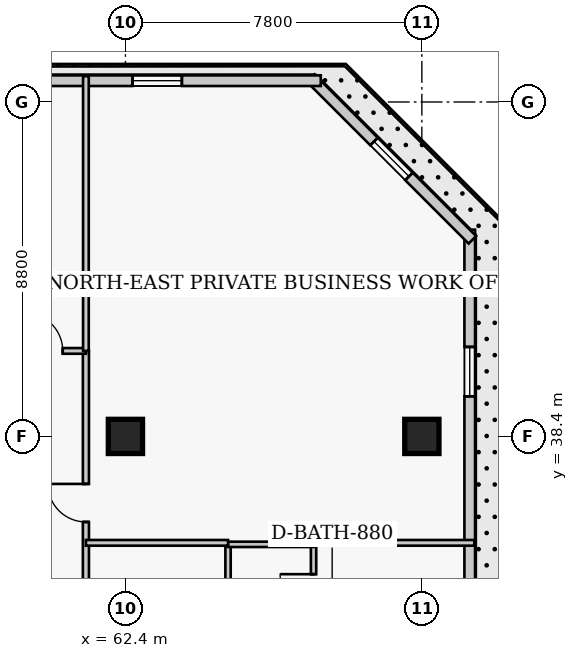
"""IFC4 building model, lengths in metres.
Left out: names, types, materials, properties, quantities, classifications, styles, units other than length and angle.
Written with IfcOpenShell. Run it as: python <this file> out.ifc"""

import sys

from ifc_helpers import new_model, si_unit, direction, frame, frame_2d, origin, origin_2d, place, context, subcontext, project, spatial, rectangle, extrude, element, fill, save


model = new_model("IFC4")
c1 = context("Model", 3, precision=1e-05, world=origin(), true_north=direction((0.0, 1.0)))
c2 = subcontext(c1, "Body", "Model", "MODEL_VIEW")
j1 = project(units=[si_unit("LENGTHUNIT", "METRE"), si_unit("PLANEANGLEUNIT", "RADIAN")], contexts=[c1])
p1 = place(None, origin())
s1 = spatial("IfcSite", under=j1, at=p1, CompositionType="ELEMENT")
p2 = place(p1, origin())
s2 = spatial("IfcBuilding", under=s1, at=p2, CompositionType="ELEMENT")
p3 = place(p2, frame((0.0, 0.0, 189.0)))
s3 = spatial("IfcBuildingStorey", under=s2, at=p3, CompositionType="ELEMENT", Elevation=189.0)
for number, where, z_axis, x_axis in (
    (1, (62.4, 38.4, 0.0), (0.0, 0.0, 1.0), (1.0, 0.0, 0.0)),
    (2, (70.2, 38.4, 0.0), (0.0, 0.0, 1.0), (1.0, 0.0, 0.0)),
):
    element("IfcColumn", number, at=place(p3, frame(where, z_axis=z_axis, x_axis=x_axis)), inside=s3, PredefinedType="COLUMN", context=c2, shape_type="SweptSolid", body=[
        extrude(rectangle(XDim=0.9, YDim=0.9, at=origin_2d()), origin(), (0.0, 0.0, 1.0), 3.9),
    ])
p4 = place(p3, frame((71.46, 13.96, 0.0), z_axis=(0.0, 0.0, 1.0), x_axis=(0.0, 1.0, 0.0)))
e3 = element("IfcWall", 3, at=p4, inside=s3, PredefinedType="SOLIDWALL", context=c2, shape_type="SweptSolid", body=[
    extrude(rectangle(XDim=29.88, YDim=0.28, at=frame_2d((14.94, 0.0))), origin(), (0.0, 0.0, 1.0), 3.65),
])
p5 = place(p4, frame((3.085, 0.0, 0.85)))
e4 = element("IfcOpeningElement", 4, at=p5, cuts=e3, PredefinedType="OPENING", context=c2, shape_type="SweptSolid", body=[
    extrude(rectangle(XDim=1.3, YDim=1.7, at=frame_2d((0.65, 0.85))), frame((0.0, 0.15, 0.0), z_axis=(0.0, -1.0, 0.0), x_axis=(1.0, 0.0, 0.0)), (0.0, 0.0, 1.0), 0.3),
])
p6 = place(p4, frame((10.555, 0.0, 0.85)))
e5 = element("IfcOpeningElement", 5, at=p6, cuts=e3, PredefinedType="OPENING", context=c2, shape_type="SweptSolid", body=[
    extrude(rectangle(XDim=1.3, YDim=1.7, at=frame_2d((0.65, 0.85))), frame((0.0, 0.15, 0.0), z_axis=(0.0, -1.0, 0.0), x_axis=(1.0, 0.0, 0.0)), (0.0, 0.0, 1.0), 0.3),
])
p7 = place(p4, frame((18.025, 0.0, 0.85)))
e6 = element("IfcOpeningElement", 6, at=p7, cuts=e3, PredefinedType="OPENING", context=c2, shape_type="SweptSolid", body=[
    extrude(rectangle(XDim=1.3, YDim=1.7, at=frame_2d((0.65, 0.85))), frame((0.0, 0.15, 0.0), z_axis=(0.0, -1.0, 0.0), x_axis=(1.0, 0.0, 0.0)), (0.0, 0.0, 1.0), 0.3),
])
p8 = place(p4, frame((25.495, 0.0, 0.85)))
e7 = element("IfcOpeningElement", 7, at=p8, cuts=e3, PredefinedType="OPENING", context=c2, shape_type="SweptSolid", body=[
    extrude(rectangle(XDim=1.3, YDim=1.7, at=frame_2d((0.65, 0.85))), frame((0.0, 0.15, 0.0), z_axis=(0.0, -1.0, 0.0), x_axis=(1.0, 0.0, 0.0)), (0.0, 0.0, 1.0), 0.3),
])
p9 = place(p3, frame((71.529, 43.573, 0.0), z_axis=(0.0, 0.0, 1.0), x_axis=(-0.707106781187, 0.707106781187, 0.0)))
e8 = element("IfcWall", 8, at=p9, inside=s3, PredefinedType="SOLIDWALL", context=c2, shape_type="SweptSolid", body=[
    extrude(rectangle(XDim=6.02, YDim=0.28, at=frame_2d((3.01, 0.0))), origin(), (0.0, 0.0, 1.0), 3.65),
])
p10 = place(p9, frame((2.36, 0.0, 0.85)))
e9 = element("IfcOpeningElement", 9, at=p10, cuts=e8, PredefinedType="OPENING", context=c2, shape_type="SweptSolid", body=[
    extrude(rectangle(XDim=1.3, YDim=1.7, at=frame_2d((0.65, 0.85))), frame((0.0, 0.15, 0.0), z_axis=(0.0, -1.0, 0.0), x_axis=(1.0, 0.0, 0.0)), (0.0, 0.0, 1.0), 0.3),
])
p11 = place(p3, frame((67.54, 47.76, 0.0), z_axis=(0.0, 0.0, 1.0), x_axis=(-1.0, 0.0, 0.0)))
e10 = element("IfcWall", 10, at=p11, inside=s3, PredefinedType="SOLIDWALL", context=c2, shape_type="SweptSolid", body=[
    extrude(rectangle(XDim=25.83, YDim=0.28, at=frame_2d((12.915, 0.0))), origin(), (0.0, 0.0, 1.0), 3.65),
])
p12 = place(p11, frame((3.655, 0.0, 0.85)))
e11 = element("IfcOpeningElement", 11, at=p12, cuts=e10, PredefinedType="OPENING", context=c2, shape_type="SweptSolid", body=[
    extrude(rectangle(XDim=1.3, YDim=1.7, at=frame_2d((0.65, 0.85))), frame((0.0, 0.15, 0.0), z_axis=(0.0, -1.0, 0.0), x_axis=(1.0, 0.0, 0.0)), (0.0, 0.0, 1.0), 0.3),
])
p13 = place(p11, frame((22.025, 0.0, 0.85)))
e12 = element("IfcOpeningElement", 12, at=p13, cuts=e10, PredefinedType="OPENING", context=c2, shape_type="SweptSolid", body=[
    extrude(rectangle(XDim=1.3, YDim=1.7, at=frame_2d((0.65, 0.85))), frame((0.0, 0.15, 0.0), z_axis=(0.0, -1.0, 0.0), x_axis=(1.0, 0.0, 0.0)), (0.0, 0.0, 1.0), 0.3),
])
p14 = place(p3, frame((61.36, 11.95, 0.0), z_axis=(0.0, 0.0, 1.0), x_axis=(0.0, 1.0, 0.0)))
e13 = element("IfcWall", 13, at=p14, inside=s3, PredefinedType="PARTITIONING", context=c2, shape_type="SweptSolid", body=[
    extrude(rectangle(XDim=28.7, YDim=0.16, at=frame_2d((14.35, 0.0))), origin(), (0.0, 0.0, 1.0), 3.65),
])
p15 = place(p14, frame((3.55, 0.0, 0.0)))
e14 = element("IfcOpeningElement", 14, at=p15, cuts=e13, PredefinedType="OPENING", context=c2, shape_type="SweptSolid", body=[
    extrude(rectangle(XDim=0.95, YDim=2.1, at=frame_2d((0.475, 1.05))), frame((0.0, 0.09, 0.0), z_axis=(0.0, -1.0, 0.0), x_axis=(1.0, 0.0, 0.0)), (0.0, 0.0, 1.0), 0.18),
])
p16 = place(p14, frame((11.975, 0.0, 0.0)))
e15 = element("IfcOpeningElement", 15, at=p16, cuts=e13, PredefinedType="OPENING", context=c2, shape_type="SweptSolid", body=[
    extrude(rectangle(XDim=0.95, YDim=2.1, at=frame_2d((0.475, 1.05))), frame((0.0, 0.09, 0.0), z_axis=(0.0, -1.0, 0.0), x_axis=(1.0, 0.0, 0.0)), (0.0, 0.0, 1.0), 0.18),
])
p17 = place(p14, frame((19.775, 0.0, 0.0)))
e16 = element("IfcOpeningElement", 16, at=p17, cuts=e13, PredefinedType="OPENING", context=c2, shape_type="SweptSolid", body=[
    extrude(rectangle(XDim=0.95, YDim=2.1, at=frame_2d((0.475, 1.05))), frame((0.0, 0.09, 0.0), z_axis=(0.0, -1.0, 0.0), x_axis=(1.0, 0.0, 0.0)), (0.0, 0.0, 1.0), 0.18),
])
p18 = place(p14, frame((24.2, 0.0, 0.0)))
e17 = element("IfcOpeningElement", 17, at=p18, cuts=e13, PredefinedType="OPENING", context=c2, shape_type="SweptSolid", body=[
    extrude(rectangle(XDim=1.0, YDim=2.15, at=frame_2d((0.5, 1.075))), frame((0.0, 0.09, 0.0), z_axis=(0.0, -1.0, 0.0), x_axis=(1.0, 0.0, 0.0)), (0.0, 0.0, 1.0), 0.18),
])
p19 = place(p3, frame((56.8, 40.65, 0.0), z_axis=(0.0, 0.0, 1.0), x_axis=(1.0, 0.0, 0.0)))
e18 = element("IfcWall", 18, at=p19, inside=s3, PredefinedType="PARTITIONING", context=c2, shape_type="SweptSolid", body=[
    extrude(rectangle(XDim=4.56, YDim=0.15, at=frame_2d((2.28, 0.0))), origin(), (0.0, 0.0, 1.0), 3.65),
])
p20 = place(p19, frame((2.95, 0.0, 0.0)))
e19 = element("IfcOpeningElement", 19, at=p20, cuts=e18, PredefinedType="OPENING", context=c2, shape_type="SweptSolid", body=[
    extrude(rectangle(XDim=1.0, YDim=2.15, at=frame_2d((0.5, 1.075))), frame((0.0, 0.085, 0.0), z_axis=(0.0, -1.0, 0.0), x_axis=(1.0, 0.0, 0.0)), (0.0, 0.0, 1.0), 0.17),
])
p21 = place(p3, frame((61.36, 40.65, 0.0), z_axis=(0.0, 0.0, 1.0), x_axis=(0.0, 1.0, 0.0)))
e20 = element("IfcWall", 20, at=p21, inside=s3, PredefinedType="PARTITIONING", context=c2, shape_type="SweptSolid", body=[
    extrude(rectangle(XDim=7.23, YDim=0.15, at=frame_2d((3.615, 0.0))), origin(), (0.0, 0.0, 1.0), 3.65),
])
p22 = place(p3, frame((65.1, 33.11, 0.0), z_axis=(0.0, 0.0, 1.0), x_axis=(0.0, 1.0, 0.0)))
e21 = element("IfcWall", 21, at=p22, inside=s3, PredefinedType="PLUMBINGWALL", context=c2, shape_type="SweptSolid", body=[
    extrude(rectangle(XDim=2.45, YDim=0.14, at=frame_2d((1.225, 0.0))), origin(), (0.0, 0.0, 1.0), 3.65),
])
p23 = place(p3, frame((67.35, 33.11, 0.0), z_axis=(0.0, 0.0, 1.0), x_axis=(0.0, 1.0, 0.0)))
e22 = element("IfcWall", 22, at=p23, inside=s3, PredefinedType="PLUMBINGWALL", context=c2, shape_type="SweptSolid", body=[
    extrude(rectangle(XDim=2.45, YDim=0.14, at=frame_2d((1.225, 0.0))), origin(), (0.0, 0.0, 1.0), 3.65),
])
p24 = place(p23, frame((0.785, 0.0, 0.0)))
e23 = element("IfcOpeningElement", 23, at=p24, cuts=e22, PredefinedType="OPENING", context=c2, shape_type="SweptSolid", body=[
    extrude(rectangle(XDim=0.88, YDim=2.05, at=frame_2d((0.44, 1.025))), frame((0.0, 0.08, 0.0), z_axis=(0.0, -1.0, 0.0), x_axis=(1.0, 0.0, 0.0)), (0.0, 0.0, 1.0), 0.16),
])
p25 = place(p3, frame((65.1, 35.56, 0.0), z_axis=(0.0, 0.0, 1.0), x_axis=(1.0, 0.0, 0.0)))
e24 = element("IfcWall", 24, at=p25, inside=s3, PredefinedType="PLUMBINGWALL", context=c2, shape_type="SweptSolid", body=[
    extrude(rectangle(XDim=2.25, YDim=0.14, at=frame_2d((1.125, 0.0))), origin(), (0.0, 0.0, 1.0), 3.65),
])
p26 = place(p3, frame((61.36, 35.6, 0.0), z_axis=(0.0, 0.0, 1.0), x_axis=(1.0, 0.0, 0.0)))
e25 = element("IfcWall", 25, at=p26, inside=s3, PredefinedType="PARTITIONING", context=c2, shape_type="SweptSolid", body=[
    extrude(rectangle(XDim=3.74, YDim=0.15, at=frame_2d((1.87, 0.0))), origin(), (0.0, 0.0, 1.0), 3.65),
])
p27 = place(p3, frame((67.35, 35.6, 0.0), z_axis=(0.0, 0.0, 1.0), x_axis=(1.0, 0.0, 0.0)))
e26 = element("IfcWall", 26, at=p27, inside=s3, PredefinedType="PARTITIONING", context=c2, shape_type="SweptSolid", body=[
    extrude(rectangle(XDim=4.23, YDim=0.15, at=frame_2d((2.115, 0.0))), origin(), (0.0, 0.0, 1.0), 3.65),
])
p28 = place(p8, origin())
e27 = element("IfcWindow", 27, at=p28, inside=s3, PartitioningType="SINGLE_PANEL", PredefinedType="WINDOW", context=c2, shape_type="SweptSolid", body=[
    extrude(rectangle(XDim=1.3, YDim=1.7, at=frame_2d((0.65, 0.85))), frame((0.0, 0.03, 0.0), z_axis=(0.0, -1.0, 0.0), x_axis=(1.0, 0.0, 0.0)), (0.0, 0.0, 1.0), 0.06),
])
fill(e7, e27)
p29 = place(p10, origin())
e28 = element("IfcWindow", 28, at=p29, inside=s3, PartitioningType="SINGLE_PANEL", PredefinedType="WINDOW", context=c2, shape_type="SweptSolid", body=[
    extrude(rectangle(XDim=1.3, YDim=1.7, at=frame_2d((0.65, 0.85))), frame((0.0, 0.03, 0.0), z_axis=(0.0, -1.0, 0.0), x_axis=(1.0, 0.0, 0.0)), (0.0, 0.0, 1.0), 0.06),
])
fill(e9, e28)
p30 = place(p12, origin())
e29 = element("IfcWindow", 29, at=p30, inside=s3, PartitioningType="SINGLE_PANEL", PredefinedType="WINDOW", context=c2, shape_type="SweptSolid", body=[
    extrude(rectangle(XDim=1.3, YDim=1.7, at=frame_2d((0.65, 0.85))), frame((0.0, 0.03, 0.0), z_axis=(0.0, -1.0, 0.0), x_axis=(1.0, 0.0, 0.0)), (0.0, 0.0, 1.0), 0.06),
])
fill(e11, e29)
p31 = place(p20, origin())
e30 = element("IfcDoor", 30, at=p31, inside=s3, OperationType="SINGLE_SWING_LEFT", PredefinedType="DOOR", context=c2, shape_type="SweptSolid", body=[
    extrude(rectangle(XDim=1.0, YDim=2.15, at=frame_2d((0.5, 1.075))), frame((0.0, 0.025, 0.0), z_axis=(0.0, -1.0, 0.0), x_axis=(1.0, 0.0, 0.0)), (0.0, 0.0, 1.0), 0.05),
])
fill(e19, e30)
p32 = place(p24, origin())
e31 = element("IfcDoor", 31, at=p32, inside=s3, OperationType="SINGLE_SWING_RIGHT", PredefinedType="DOOR", context=c2, shape_type="SweptSolid", body=[
    extrude(rectangle(XDim=0.88, YDim=2.05, at=frame_2d((0.44, 1.025))), frame((0.0, 0.025, 0.0), z_axis=(0.0, -1.0, 0.0), x_axis=(1.0, 0.0, 0.0)), (0.0, 0.0, 1.0), 0.05),
])
fill(e23, e31)
p33 = place(p18, origin())
e32 = element("IfcDoor", 32, at=p33, inside=s3, OperationType="SINGLE_SWING_RIGHT", PredefinedType="DOOR", context=c2, shape_type="SweptSolid", body=[
    extrude(rectangle(XDim=1.0, YDim=2.15, at=frame_2d((0.5, 1.075))), frame((0.0, 0.025, 0.0), z_axis=(0.0, -1.0, 0.0), x_axis=(1.0, 0.0, 0.0)), (0.0, 0.0, 1.0), 0.05),
])
fill(e17, e32)
save(model, sys.argv[1])
